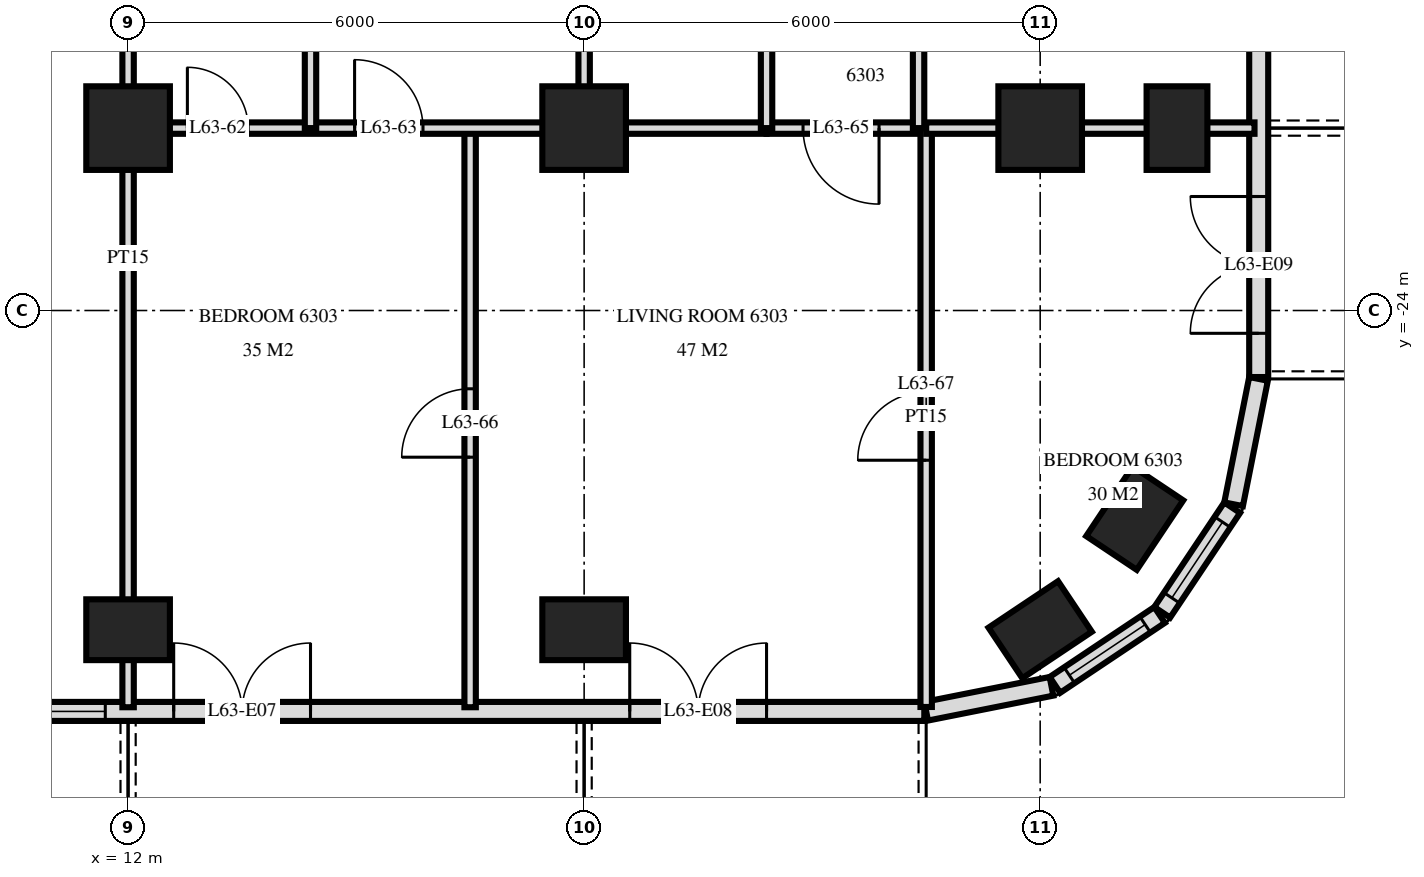
"""IFC4 building model, lengths in metres.
Left out: names, types, materials, properties, quantities, classifications, styles, units other than length and angle.
Written with IfcOpenShell. Run it as: python <this file> out.ifc"""

import sys

from ifc_helpers import new_model, si_unit, direction, frame, frame_2d, origin, origin_2d, place, context, subcontext, project, spatial, rectangle, extrude, element, fill, save


model = new_model("IFC4")
c1 = context("Model", 3, precision=1e-05, world=origin(), true_north=direction((0.0, 1.0)))
c2 = subcontext(c1, "Body", "Model", "MODEL_VIEW")
j1 = project(units=[si_unit("LENGTHUNIT", "METRE"), si_unit("PLANEANGLEUNIT", "RADIAN")], contexts=[c1])
p1 = place(None, origin())
s1 = spatial("IfcSite", under=j1, at=p1, CompositionType="ELEMENT")
p2 = place(p1, origin())
s2 = spatial("IfcBuilding", under=s1, at=p2, CompositionType="ELEMENT")
p3 = place(p2, frame((0.0, 0.0, 239.6)))
s3 = spatial("IfcBuildingStorey", under=s2, at=p3, CompositionType="ELEMENT", Elevation=239.6)
p4 = place(p3, frame((12.0, -28.2, 0.0), z_axis=(0.0, 0.0, 1.0), x_axis=(1.0, 0.0, 0.0)))
e1 = element("IfcColumn", 1, at=p4, inside=s3, PredefinedType="COLUMN", context=c2, shape_type="SweptSolid", body=[
    extrude(rectangle(XDim=1.1, YDim=0.8, at=origin_2d()), origin(), (0.0, 0.0, 1.0), 3.5),
])
p5 = place(p3, frame((12.0, -21.6, 0.0), z_axis=(0.0, 0.0, 1.0), x_axis=(1.0, 0.0, 0.0)))
e2 = element("IfcColumn", 2, at=p5, inside=s3, PredefinedType="COLUMN", context=c2, shape_type="SweptSolid", body=[
    extrude(rectangle(XDim=1.1, YDim=1.1, at=origin_2d()), origin(), (0.0, 0.0, 1.0), 3.5),
])
p6 = place(p3, frame((18.0, -28.2, 0.0), z_axis=(0.0, 0.0, 1.0), x_axis=(1.0, 0.0, 0.0)))
e3 = element("IfcColumn", 3, at=p6, inside=s3, PredefinedType="COLUMN", context=c2, shape_type="SweptSolid", body=[
    extrude(rectangle(XDim=1.1, YDim=0.8, at=origin_2d()), origin(), (0.0, 0.0, 1.0), 3.5),
])
p7 = place(p3, frame((18.0, -21.6, 0.0), z_axis=(0.0, 0.0, 1.0), x_axis=(1.0, 0.0, 0.0)))
e4 = element("IfcColumn", 4, at=p7, inside=s3, PredefinedType="COLUMN", context=c2, shape_type="SweptSolid", body=[
    extrude(rectangle(XDim=1.1, YDim=1.1, at=origin_2d()), origin(), (0.0, 0.0, 1.0), 3.5),
])
p8 = place(p3, frame((24.0, -28.2, 0.0), z_axis=(0.0, 0.0, 1.0), x_axis=(0.831459915646, 0.555584744817, 0.0)))
e5 = element("IfcColumn", 5, at=p8, inside=s3, PredefinedType="COLUMN", context=c2, shape_type="SweptSolid", body=[
    extrude(rectangle(XDim=1.1, YDim=0.8, at=origin_2d()), origin(), (0.0, 0.0, 1.0), 3.5),
])
p9 = place(p3, frame((24.0, -21.6, 0.0), z_axis=(0.0, 0.0, 1.0), x_axis=(1.0, 0.0, 0.0)))
e6 = element("IfcColumn", 6, at=p9, inside=s3, PredefinedType="COLUMN", context=c2, shape_type="SweptSolid", body=[
    extrude(rectangle(XDim=1.1, YDim=1.1, at=origin_2d()), origin(), (0.0, 0.0, 1.0), 3.5),
])
for number, where, z_axis, x_axis in (
    (7, (25.244, -26.733, 0.0), (0.0, 0.0, 1.0), (0.556, 0.831, 0.0)),
    (8, (25.8, -21.6, 0.0), (0.0, 0.0, 1.0), (0.0, 1.0, 0.0)),
):
    element("IfcColumn", number, at=place(p3, frame(where, z_axis=z_axis, x_axis=x_axis)), inside=s3, PredefinedType="COLUMN", context=c2, shape_type="SweptSolid", body=[
        extrude(rectangle(XDim=1.1, YDim=0.8, at=origin_2d()), origin(), (0.0, 0.0, 1.0), 3.5),
    ])
p10 = place(p3, frame((-22.475, -29.275, 0.0), z_axis=(0.0, 0.0, 1.0), x_axis=(1.0, 0.0, 0.0)))
e9 = element("IfcWall", 9, at=p10, inside=s3, PredefinedType="SOLIDWALL", context=c2, shape_type="SweptSolid", body=[
    extrude(rectangle(XDim=44.951, YDim=0.25, at=frame_2d((22.475, 0.0))), origin(), (0.0, 0.0, 1.0), 3.22),
])
p11 = place(p10, frame((0.575, 0.0, 0.0)))
e10 = element("IfcOpeningElement", 10, at=p11, cuts=e9, PredefinedType="OPENING", context=c2, shape_type="SweptSolid", body=[
    extrude(rectangle(XDim=1.8, YDim=2.4, at=frame_2d((0.9, 1.2))), frame((0.0, 0.135, 0.0), z_axis=(0.0, -1.0, 0.0), x_axis=(1.0, 0.0, 0.0)), (0.0, 0.0, 1.0), 0.27),
])
p12 = place(p10, frame((4.775, 0.0, 0.9)))
e11 = element("IfcOpeningElement", 11, at=p12, cuts=e9, PredefinedType="OPENING", context=c2, shape_type="SweptSolid", body=[
    extrude(rectangle(XDim=2.4, YDim=1.5, at=frame_2d((1.2, 0.75))), frame((0.0, 0.135, 0.0), z_axis=(0.0, -1.0, 0.0), x_axis=(1.0, 0.0, 0.0)), (0.0, 0.0, 1.0), 0.27),
])
p13 = place(p10, frame((8.075, 0.0, 0.0)))
e12 = element("IfcOpeningElement", 12, at=p13, cuts=e9, PredefinedType="OPENING", context=c2, shape_type="SweptSolid", body=[
    extrude(rectangle(XDim=1.8, YDim=2.4, at=frame_2d((0.9, 1.2))), frame((0.0, 0.135, 0.0), z_axis=(0.0, -1.0, 0.0), x_axis=(1.0, 0.0, 0.0)), (0.0, 0.0, 1.0), 0.27),
])
p14 = place(p10, frame((11.075, 0.0, 0.0)))
e13 = element("IfcOpeningElement", 13, at=p14, cuts=e9, PredefinedType="OPENING", context=c2, shape_type="SweptSolid", body=[
    extrude(rectangle(XDim=1.8, YDim=2.4, at=frame_2d((0.9, 1.2))), frame((0.0, 0.135, 0.0), z_axis=(0.0, -1.0, 0.0), x_axis=(1.0, 0.0, 0.0)), (0.0, 0.0, 1.0), 0.27),
])
p15 = place(p10, frame((13.775, 0.0, 0.9)))
e14 = element("IfcOpeningElement", 14, at=p15, cuts=e9, PredefinedType="OPENING", context=c2, shape_type="SweptSolid", body=[
    extrude(rectangle(XDim=2.4, YDim=1.5, at=frame_2d((1.2, 0.75))), frame((0.0, 0.135, 0.0), z_axis=(0.0, -1.0, 0.0), x_axis=(1.0, 0.0, 0.0)), (0.0, 0.0, 1.0), 0.27),
])
p16 = place(p10, frame((16.775, 0.0, 0.9)))
e15 = element("IfcOpeningElement", 15, at=p16, cuts=e9, PredefinedType="OPENING", context=c2, shape_type="SweptSolid", body=[
    extrude(rectangle(XDim=2.4, YDim=1.5, at=frame_2d((1.2, 0.75))), frame((0.0, 0.135, 0.0), z_axis=(0.0, -1.0, 0.0), x_axis=(1.0, 0.0, 0.0)), (0.0, 0.0, 1.0), 0.27),
])
p17 = place(p10, frame((20.075, 0.0, 0.0)))
e16 = element("IfcOpeningElement", 16, at=p17, cuts=e9, PredefinedType="OPENING", context=c2, shape_type="SweptSolid", body=[
    extrude(rectangle(XDim=1.8, YDim=2.4, at=frame_2d((0.9, 1.2))), frame((0.0, 0.135, 0.0), z_axis=(0.0, -1.0, 0.0), x_axis=(1.0, 0.0, 0.0)), (0.0, 0.0, 1.0), 0.27),
])
p18 = place(p10, frame((23.075, 0.0, 0.0)))
e17 = element("IfcOpeningElement", 17, at=p18, cuts=e9, PredefinedType="OPENING", context=c2, shape_type="SweptSolid", body=[
    extrude(rectangle(XDim=1.8, YDim=2.4, at=frame_2d((0.9, 1.2))), frame((0.0, 0.135, 0.0), z_axis=(0.0, -1.0, 0.0), x_axis=(1.0, 0.0, 0.0)), (0.0, 0.0, 1.0), 0.27),
])
p19 = place(p10, frame((25.775, 0.0, 0.9)))
e18 = element("IfcOpeningElement", 18, at=p19, cuts=e9, PredefinedType="OPENING", context=c2, shape_type="SweptSolid", body=[
    extrude(rectangle(XDim=2.4, YDim=1.5, at=frame_2d((1.2, 0.75))), frame((0.0, 0.135, 0.0), z_axis=(0.0, -1.0, 0.0), x_axis=(1.0, 0.0, 0.0)), (0.0, 0.0, 1.0), 0.27),
])
p20 = place(p10, frame((29.075, 0.0, 0.0)))
e19 = element("IfcOpeningElement", 19, at=p20, cuts=e9, PredefinedType="OPENING", context=c2, shape_type="SweptSolid", body=[
    extrude(rectangle(XDim=1.8, YDim=2.4, at=frame_2d((0.9, 1.2))), frame((0.0, 0.135, 0.0), z_axis=(0.0, -1.0, 0.0), x_axis=(1.0, 0.0, 0.0)), (0.0, 0.0, 1.0), 0.27),
])
p21 = place(p10, frame((31.775, 0.0, 0.9)))
e20 = element("IfcOpeningElement", 20, at=p21, cuts=e9, PredefinedType="OPENING", context=c2, shape_type="SweptSolid", body=[
    extrude(rectangle(XDim=2.4, YDim=1.5, at=frame_2d((1.2, 0.75))), frame((0.0, 0.135, 0.0), z_axis=(0.0, -1.0, 0.0), x_axis=(1.0, 0.0, 0.0)), (0.0, 0.0, 1.0), 0.27),
])
p22 = place(p10, frame((35.075, 0.0, 0.0)))
e21 = element("IfcOpeningElement", 21, at=p22, cuts=e9, PredefinedType="OPENING", context=c2, shape_type="SweptSolid", body=[
    extrude(rectangle(XDim=1.8, YDim=2.4, at=frame_2d((0.9, 1.2))), frame((0.0, 0.135, 0.0), z_axis=(0.0, -1.0, 0.0), x_axis=(1.0, 0.0, 0.0)), (0.0, 0.0, 1.0), 0.27),
])
p23 = place(p10, frame((41.075, 0.0, 0.0)))
e22 = element("IfcOpeningElement", 22, at=p23, cuts=e9, PredefinedType="OPENING", context=c2, shape_type="SweptSolid", body=[
    extrude(rectangle(XDim=1.8, YDim=2.4, at=frame_2d((0.9, 1.2))), frame((0.0, 0.135, 0.0), z_axis=(0.0, -1.0, 0.0), x_axis=(1.0, 0.0, 0.0)), (0.0, 0.0, 1.0), 0.27),
])
p24 = place(p3, frame((22.5, -29.273, 0.0), z_axis=(0.0, 0.0, 1.0), x_axis=(0.980775640221, 0.19513878023, 0.0)))
e23 = element("IfcWall", 23, at=p24, inside=s3, PredefinedType="SOLIDWALL", context=c2, shape_type="SweptSolid", body=[
    extrude(rectangle(XDim=1.681, YDim=0.25, at=frame_2d((0.841, 0.0))), origin(), (0.0, 0.0, 1.0), 3.22),
])
p25 = place(p3, frame((24.194, -28.926, 0.0), z_axis=(0.0, 0.0, 1.0), x_axis=(0.831482937015, 0.55555029066, 0.0)))
e24 = element("IfcWall", 24, at=p25, inside=s3, PredefinedType="SOLIDWALL", context=c2, shape_type="SweptSolid", body=[
    extrude(rectangle(XDim=1.656, YDim=0.25, at=frame_2d((0.828, 0.0))), origin(), (0.0, 0.0, 1.0), 3.22),
])
p26 = place(p25, frame((0.228, 0.0, 0.9)))
e25 = element("IfcOpeningElement", 25, at=p26, cuts=e24, PredefinedType="OPENING", context=c2, shape_type="SweptSolid", body=[
    extrude(rectangle(XDim=1.2, YDim=1.5, at=frame_2d((0.6, 0.75))), frame((0.0, 0.135, 0.0), z_axis=(0.0, -1.0, 0.0), x_axis=(1.0, 0.0, 0.0)), (0.0, 0.0, 1.0), 0.27),
])
p27 = place(p3, frame((25.606, -27.971, 0.0), z_axis=(0.0, 0.0, 1.0), x_axis=(0.55555029066, 0.831482937015, 0.0)))
e26 = element("IfcWall", 26, at=p27, inside=s3, PredefinedType="SOLIDWALL", context=c2, shape_type="SweptSolid", body=[
    extrude(rectangle(XDim=1.656, YDim=0.25, at=frame_2d((0.828, 0.0))), origin(), (0.0, 0.0, 1.0), 3.22),
])
p28 = place(p27, frame((0.228, 0.0, 0.9)))
e27 = element("IfcOpeningElement", 27, at=p28, cuts=e26, PredefinedType="OPENING", context=c2, shape_type="SweptSolid", body=[
    extrude(rectangle(XDim=1.2, YDim=1.5, at=frame_2d((0.6, 0.75))), frame((0.0, 0.135, 0.0), z_axis=(0.0, -1.0, 0.0), x_axis=(1.0, 0.0, 0.0)), (0.0, 0.0, 1.0), 0.27),
])
p29 = place(p3, frame((26.545, -26.549, 0.0), z_axis=(0.0, 0.0, 1.0), x_axis=(0.195026884138, 0.980797896849, 0.0)))
e28 = element("IfcWall", 28, at=p29, inside=s3, PredefinedType="SOLIDWALL", context=c2, shape_type="SweptSolid", body=[
    extrude(rectangle(XDim=1.681, YDim=0.25, at=frame_2d((0.841, 0.0))), origin(), (0.0, 0.0, 1.0), 3.22),
])
p30 = place(p3, frame((26.875, -24.875, 0.0), z_axis=(0.0, 0.0, 1.0), x_axis=(0.0, 1.0, 0.0)))
e29 = element("IfcWall", 29, at=p30, inside=s3, PredefinedType="SOLIDWALL", context=c2, shape_type="SweptSolid", body=[
    extrude(rectangle(XDim=21.551, YDim=0.25, at=frame_2d((10.775, 0.0))), origin(), (0.0, 0.0, 1.0), 3.22),
])
p31 = place(p30, frame((0.575, 0.0, 0.0)))
e30 = element("IfcOpeningElement", 30, at=p31, cuts=e29, PredefinedType="OPENING", context=c2, shape_type="SweptSolid", body=[
    extrude(rectangle(XDim=1.8, YDim=2.4, at=frame_2d((0.9, 1.2))), frame((0.0, 0.135, 0.0), z_axis=(0.0, -1.0, 0.0), x_axis=(1.0, 0.0, 0.0)), (0.0, 0.0, 1.0), 0.27),
])
p32 = place(p30, frame((4.475, 0.0, 0.0)))
e31 = element("IfcOpeningElement", 31, at=p32, cuts=e29, PredefinedType="OPENING", context=c2, shape_type="SweptSolid", body=[
    extrude(rectangle(XDim=1.8, YDim=2.4, at=frame_2d((0.9, 1.2))), frame((0.0, 0.135, 0.0), z_axis=(0.0, -1.0, 0.0), x_axis=(1.0, 0.0, 0.0)), (0.0, 0.0, 1.0), 0.27),
])
p33 = place(p30, frame((8.075, 0.0, 0.9)))
e32 = element("IfcOpeningElement", 32, at=p33, cuts=e29, PredefinedType="OPENING", context=c2, shape_type="SweptSolid", body=[
    extrude(rectangle(XDim=1.2, YDim=1.5, at=frame_2d((0.6, 0.75))), frame((0.0, 0.135, 0.0), z_axis=(0.0, -1.0, 0.0), x_axis=(1.0, 0.0, 0.0)), (0.0, 0.0, 1.0), 0.27),
])
p34 = place(p30, frame((12.225, 0.0, 0.0)))
e33 = element("IfcOpeningElement", 33, at=p34, cuts=e29, PredefinedType="OPENING", context=c2, shape_type="SweptSolid", body=[
    extrude(rectangle(XDim=1.8, YDim=2.4, at=frame_2d((0.9, 1.2))), frame((0.0, 0.135, 0.0), z_axis=(0.0, -1.0, 0.0), x_axis=(1.0, 0.0, 0.0)), (0.0, 0.0, 1.0), 0.27),
])
p35 = place(p3, frame((22.5, -29.217, 0.0), z_axis=(0.0, 0.0, 1.0), x_axis=(0.0, 1.0, 0.0)))
e34 = element("IfcWall", 34, at=p35, inside=s3, PredefinedType="PARTITIONING", context=c2, shape_type="SweptSolid", body=[
    extrude(rectangle(XDim=7.616, YDim=0.15, at=frame_2d((3.808, 0.0))), origin(), (0.0, 0.0, 1.0), 3.22),
])
p36 = place(p35, frame((3.247, 0.0, 0.0)))
e35 = element("IfcOpeningElement", 35, at=p36, cuts=e34, PredefinedType="OPENING", context=c2, shape_type="SweptSolid", body=[
    extrude(rectangle(XDim=0.9, YDim=2.1, at=frame_2d((0.45, 1.05))), frame((0.0, 0.085, 0.0), z_axis=(0.0, -1.0, 0.0), x_axis=(1.0, 0.0, 0.0)), (0.0, 0.0, 1.0), 0.17),
])
p37 = place(p3, frame((22.4, -21.6, 0.0), z_axis=(0.0, 0.0, 1.0), x_axis=(0.0, 1.0, 0.0)))
e36 = element("IfcWall", 36, at=p37, inside=s3, PredefinedType="PARTITIONING", context=c2, shape_type="SweptSolid", body=[
    extrude(rectangle(XDim=4.2, YDim=0.15, at=frame_2d((2.1, 0.0))), origin(), (0.0, 0.0, 1.0), 3.22),
])
p38 = place(p3, frame((20.4, -21.6, 0.0), z_axis=(0.0, 0.0, 1.0), x_axis=(0.0, 1.0, 0.0)))
e37 = element("IfcWall", 37, at=p38, inside=s3, PredefinedType="PARTITIONING", context=c2, shape_type="SweptSolid", body=[
    extrude(rectangle(XDim=4.2, YDim=0.15, at=frame_2d((2.1, 0.0))), origin(), (0.0, 0.0, 1.0), 3.22),
])
p39 = place(p38, frame((1.6, 0.0, 0.0)))
e38 = element("IfcOpeningElement", 38, at=p39, cuts=e37, PredefinedType="OPENING", context=c2, shape_type="SweptSolid", body=[
    extrude(rectangle(XDim=1.0, YDim=2.1, at=frame_2d((0.5, 1.05))), frame((0.0, 0.085, 0.0), z_axis=(0.0, -1.0, 0.0), x_axis=(1.0, 0.0, 0.0)), (0.0, 0.0, 1.0), 0.17),
])
p40 = place(p3, frame((18.0, -21.6, 0.0), z_axis=(0.0, 0.0, 1.0), x_axis=(0.0, 1.0, 0.0)))
e39 = element("IfcWall", 39, at=p40, inside=s3, PredefinedType="PARTITIONING", context=c2, shape_type="SweptSolid", body=[
    extrude(rectangle(XDim=4.2, YDim=0.15, at=frame_2d((2.1, 0.0))), origin(), (0.0, 0.0, 1.0), 3.22),
])
p41 = place(p3, frame((16.5, -29.22, 0.0), z_axis=(0.0, 0.0, 1.0), x_axis=(0.0, 1.0, 0.0)))
e40 = element("IfcWall", 40, at=p41, inside=s3, PredefinedType="PARTITIONING", context=c2, shape_type="SweptSolid", body=[
    extrude(rectangle(XDim=7.62, YDim=0.15, at=frame_2d((3.81, 0.0))), origin(), (0.0, 0.0, 1.0), 3.22),
])
p42 = place(p41, frame((3.29, 0.0, 0.0)))
e41 = element("IfcOpeningElement", 41, at=p42, cuts=e40, PredefinedType="OPENING", context=c2, shape_type="SweptSolid", body=[
    extrude(rectangle(XDim=0.9, YDim=2.1, at=frame_2d((0.45, 1.05))), frame((0.0, 0.085, 0.0), z_axis=(0.0, -1.0, 0.0), x_axis=(1.0, 0.0, 0.0)), (0.0, 0.0, 1.0), 0.17),
])
p43 = place(p3, frame((14.4, -21.6, 0.0), z_axis=(0.0, 0.0, 1.0), x_axis=(0.0, 1.0, 0.0)))
e42 = element("IfcWall", 42, at=p43, inside=s3, PredefinedType="PARTITIONING", context=c2, shape_type="SweptSolid", body=[
    extrude(rectangle(XDim=4.2, YDim=0.15, at=frame_2d((2.1, 0.0))), origin(), (0.0, 0.0, 1.0), 3.22),
])
p44 = place(p3, frame((12.0, -29.22, 0.0), z_axis=(0.0, 0.0, 1.0), x_axis=(0.0, 1.0, 0.0)))
e43 = element("IfcWall", 43, at=p44, inside=s3, PredefinedType="PARTITIONING", context=c2, shape_type="SweptSolid", body=[
    extrude(rectangle(XDim=11.82, YDim=0.15, at=frame_2d((5.91, 0.0))), origin(), (0.0, 0.0, 1.0), 3.22),
])
p45 = place(p3, frame((20.4, -21.6, 0.0), z_axis=(0.0, 0.0, 1.0), x_axis=(1.0, 0.0, 0.0)))
e44 = element("IfcWall", 44, at=p45, inside=s3, PredefinedType="PARTITIONING", context=c2, shape_type="SweptSolid", body=[
    extrude(rectangle(XDim=2.0, YDim=0.15, at=frame_2d((1.0, 0.0))), origin(), (0.0, 0.0, 1.0), 3.22),
])
p46 = place(p45, frame((0.48, 0.0, 0.0)))
e45 = element("IfcOpeningElement", 45, at=p46, cuts=e44, PredefinedType="OPENING", context=c2, shape_type="SweptSolid", body=[
    extrude(rectangle(XDim=1.0, YDim=2.1, at=frame_2d((0.5, 1.05))), frame((0.0, 0.085, 0.0), z_axis=(0.0, -1.0, 0.0), x_axis=(1.0, 0.0, 0.0)), (0.0, 0.0, 1.0), 0.17),
])
p47 = place(p3, frame((12.0, -21.6, 0.0), z_axis=(0.0, 0.0, 1.0), x_axis=(1.0, 0.0, 0.0)))
e46 = element("IfcWall", 46, at=p47, inside=s3, PredefinedType="PARTITIONING", context=c2, shape_type="SweptSolid", body=[
    extrude(rectangle(XDim=8.4, YDim=0.15, at=frame_2d((4.2, 0.0))), origin(), (0.0, 0.0, 1.0), 3.22),
])
p48 = place(p47, frame((0.78, 0.0, 0.0)))
e47 = element("IfcOpeningElement", 47, at=p48, cuts=e46, PredefinedType="OPENING", context=c2, shape_type="SweptSolid", body=[
    extrude(rectangle(XDim=0.8, YDim=2.1, at=frame_2d((0.4, 1.05))), frame((0.0, 0.085, 0.0), z_axis=(0.0, -1.0, 0.0), x_axis=(1.0, 0.0, 0.0)), (0.0, 0.0, 1.0), 0.17),
])
p49 = place(p47, frame((2.98, 0.0, 0.0)))
e48 = element("IfcOpeningElement", 48, at=p49, cuts=e46, PredefinedType="OPENING", context=c2, shape_type="SweptSolid", body=[
    extrude(rectangle(XDim=0.9, YDim=2.1, at=frame_2d((0.45, 1.05))), frame((0.0, 0.085, 0.0), z_axis=(0.0, -1.0, 0.0), x_axis=(1.0, 0.0, 0.0)), (0.0, 0.0, 1.0), 0.17),
])
p50 = place(p3, frame((22.5, -21.6, 0.0), z_axis=(0.0, 0.0, 1.0), x_axis=(1.0, 0.0, 0.0)))
e49 = element("IfcWall", 49, at=p50, inside=s3, PredefinedType="PARTITIONING", context=c2, shape_type="SweptSolid", body=[
    extrude(rectangle(XDim=4.32, YDim=0.15, at=frame_2d((2.16, 0.0))), origin(), (0.0, 0.0, 1.0), 3.22),
])
p51 = place(p26, origin())
e50 = element("IfcWindow", 50, at=p51, inside=s3, PartitioningType="SINGLE_PANEL", PredefinedType="WINDOW", context=c2, shape_type="SweptSolid", body=[
    extrude(rectangle(XDim=1.2, YDim=1.5, at=frame_2d((0.6, 0.75))), frame((0.0, 0.03, 0.0), z_axis=(0.0, -1.0, 0.0), x_axis=(1.0, 0.0, 0.0)), (0.0, 0.0, 1.0), 0.06),
])
fill(e25, e50)
p52 = place(p28, origin())
e51 = element("IfcWindow", 51, at=p52, inside=s3, PartitioningType="SINGLE_PANEL", PredefinedType="WINDOW", context=c2, shape_type="SweptSolid", body=[
    extrude(rectangle(XDim=1.2, YDim=1.5, at=frame_2d((0.6, 0.75))), frame((0.0, 0.03, 0.0), z_axis=(0.0, -1.0, 0.0), x_axis=(1.0, 0.0, 0.0)), (0.0, 0.0, 1.0), 0.06),
])
fill(e27, e51)
p53 = place(p21, origin())
e52 = element("IfcWindow", 52, at=p53, inside=s3, PartitioningType="SINGLE_PANEL", PredefinedType="WINDOW", context=c2, shape_type="SweptSolid", body=[
    extrude(rectangle(XDim=2.4, YDim=1.5, at=frame_2d((1.2, 0.75))), frame((0.0, 0.03, 0.0), z_axis=(0.0, -1.0, 0.0), x_axis=(1.0, 0.0, 0.0)), (0.0, 0.0, 1.0), 0.06),
])
fill(e20, e52)
p54 = place(p22, origin())
e53 = element("IfcDoor", 53, at=p54, inside=s3, OperationType="DOUBLE_DOOR_SINGLE_SWING", PredefinedType="DOOR", context=c2, shape_type="SweptSolid", body=[
    extrude(rectangle(XDim=1.8, YDim=2.4, at=frame_2d((0.9, 1.2))), frame((0.0, 0.025, 0.0), z_axis=(0.0, -1.0, 0.0), x_axis=(1.0, 0.0, 0.0)), (0.0, 0.0, 1.0), 0.05),
])
fill(e21, e53)
p55 = place(p23, origin())
e54 = element("IfcDoor", 54, at=p55, inside=s3, OperationType="DOUBLE_DOOR_SINGLE_SWING", PredefinedType="DOOR", context=c2, shape_type="SweptSolid", body=[
    extrude(rectangle(XDim=1.8, YDim=2.4, at=frame_2d((0.9, 1.2))), frame((0.0, 0.025, 0.0), z_axis=(0.0, -1.0, 0.0), x_axis=(1.0, 0.0, 0.0)), (0.0, 0.0, 1.0), 0.05),
])
fill(e22, e54)
p56 = place(p31, origin())
e55 = element("IfcDoor", 55, at=p56, inside=s3, OperationType="DOUBLE_DOOR_SINGLE_SWING", PredefinedType="DOOR", context=c2, shape_type="SweptSolid", body=[
    extrude(rectangle(XDim=1.8, YDim=2.4, at=frame_2d((0.9, 1.2))), frame((0.0, 0.025, 0.0), z_axis=(0.0, -1.0, 0.0), x_axis=(1.0, 0.0, 0.0)), (0.0, 0.0, 1.0), 0.05),
])
fill(e30, e55)
p57 = place(p48, origin())
e56 = element("IfcDoor", 56, at=p57, inside=s3, OperationType="SINGLE_SWING_RIGHT", PredefinedType="DOOR", context=c2, shape_type="SweptSolid", body=[
    extrude(rectangle(XDim=0.8, YDim=2.1, at=frame_2d((0.4, 1.05))), frame((0.0, 0.025, 0.0), z_axis=(0.0, -1.0, 0.0), x_axis=(1.0, 0.0, 0.0)), (0.0, 0.0, 1.0), 0.05),
])
fill(e47, e56)
p58 = place(p49, origin())
e57 = element("IfcDoor", 57, at=p58, inside=s3, OperationType="SINGLE_SWING_RIGHT", PredefinedType="DOOR", context=c2, shape_type="SweptSolid", body=[
    extrude(rectangle(XDim=0.9, YDim=2.1, at=frame_2d((0.45, 1.05))), frame((0.0, 0.025, 0.0), z_axis=(0.0, -1.0, 0.0), x_axis=(1.0, 0.0, 0.0)), (0.0, 0.0, 1.0), 0.05),
])
fill(e48, e57)
p59 = place(p46, frame((0.5, 0.0, 0.0), z_axis=(0.0, 0.0, 1.0), x_axis=(-1.0, 0.0, 0.0)))
e58 = element("IfcDoor", 58, at=p59, inside=s3, OperationType="SINGLE_SWING_RIGHT", PredefinedType="DOOR", context=c2, shape_type="SweptSolid", body=[
    extrude(rectangle(XDim=1.0, YDim=2.1, at=frame_2d((0.0, 1.05))), frame((0.0, -0.025, 0.0), z_axis=(0.0, 1.0, 0.0), x_axis=(-1.0, 0.0, 0.0)), (0.0, 0.0, 1.0), 0.05),
])
fill(e45, e58)
p60 = place(p42, origin())
e59 = element("IfcDoor", 59, at=p60, inside=s3, OperationType="SINGLE_SWING_RIGHT", PredefinedType="DOOR", context=c2, shape_type="SweptSolid", body=[
    extrude(rectangle(XDim=0.9, YDim=2.1, at=frame_2d((0.45, 1.05))), frame((0.0, 0.025, 0.0), z_axis=(0.0, -1.0, 0.0), x_axis=(1.0, 0.0, 0.0)), (0.0, 0.0, 1.0), 0.05),
])
fill(e41, e59)
p61 = place(p36, origin())
e60 = element("IfcDoor", 60, at=p61, inside=s3, OperationType="SINGLE_SWING_RIGHT", PredefinedType="DOOR", context=c2, shape_type="SweptSolid", body=[
    extrude(rectangle(XDim=0.9, YDim=2.1, at=frame_2d((0.45, 1.05))), frame((0.0, 0.025, 0.0), z_axis=(0.0, -1.0, 0.0), x_axis=(1.0, 0.0, 0.0)), (0.0, 0.0, 1.0), 0.05),
])
fill(e35, e60)
save(model, sys.argv[1])
